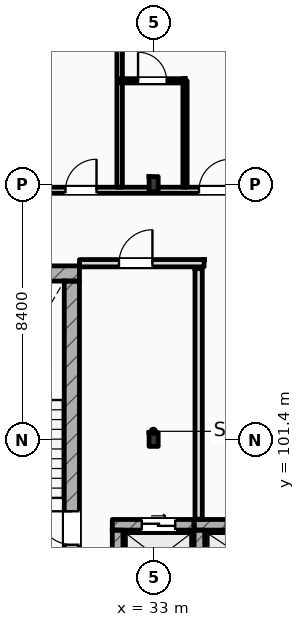
"""IFC4 building model, lengths in metres.
Left out: names, types, materials, properties, quantities, classifications, styles, units other than length and angle.
Written with IfcOpenShell. Run it as: python <this file> out.ifc"""

import sys

from ifc_helpers import new_model, si_unit, direction, frame, frame_2d, origin, origin_2d, place, context, subcontext, project, spatial, rectangle, i_section, extrude, element, fill, save


model = new_model("IFC4")
c1 = context("Model", 3, precision=1e-05, world=origin(), true_north=direction((0.0, 1.0)))
c2 = subcontext(c1, "Body", "Model", "MODEL_VIEW")
j1 = project(units=[si_unit("LENGTHUNIT", "METRE"), si_unit("PLANEANGLEUNIT", "RADIAN")], contexts=[c1])
p1 = place(None, origin())
s1 = spatial("IfcSite", under=j1, at=p1, CompositionType="ELEMENT")
p2 = place(p1, origin())
s2 = spatial("IfcBuilding", under=s1, at=p2, CompositionType="ELEMENT")
p3 = place(p2, frame((0.0, 0.0, 28.2)))
s3 = spatial("IfcBuildingStorey", under=s2, at=p3, CompositionType="ELEMENT", Elevation=28.2)
p4 = place(p3, frame((33.0, 101.4, 0.0), z_axis=(0.0, 0.0, 1.0), x_axis=(1.0, 0.0, 0.0)))
e1 = element("IfcColumn", 1, at=p4, inside=s3, PredefinedType="COLUMN", context=c2, shape_type="SweptSolid", body=[
    extrude(i_section(OverallWidth=0.3, OverallDepth=0.45, WebThickness=0.014, FlangeThickness=0.026, FilletRadius=0.027, at=origin_2d()), origin(), (0.0, 0.0, 1.0), 3.6),
])
p5 = place(p3, frame((33.0, 109.8, 0.0), z_axis=(0.0, 0.0, 1.0), x_axis=(1.0, 0.0, 0.0)))
e2 = element("IfcColumn", 2, at=p5, inside=s3, PredefinedType="COLUMN", context=c2, shape_type="SweptSolid", body=[
    extrude(i_section(OverallWidth=0.3, OverallDepth=0.5, WebThickness=0.014, FlangeThickness=0.028, FilletRadius=0.027, at=origin_2d()), origin(), (0.0, 0.0, 1.0), 3.6),
])
p6 = place(p3, frame((25.4, 106.862, 0.0), z_axis=(0.0, 0.0, 1.0), x_axis=(1.0, 0.0, 0.0)))
e3 = element("IfcWall", 3, at=p6, inside=s3, PredefinedType="SHEAR", context=c2, shape_type="SweptSolid", body=[
    extrude(rectangle(XDim=5.16, YDim=0.5, at=frame_2d((2.58, 0.0))), origin(), (0.0, 0.0, 1.0), 3.6),
])
p7 = place(p3, frame((30.31, 97.5, 0.0), z_axis=(0.0, 0.0, 1.0), x_axis=(0.0, 1.0, 0.0)))
e4 = element("IfcWall", 4, at=p7, inside=s3, PredefinedType="SHEAR", context=c2, shape_type="SweptSolid", body=[
    extrude(rectangle(XDim=9.112, YDim=0.5, at=frame_2d((4.556, 0.0))), origin(), (0.0, 0.0, 1.0), 3.6),
])
p8 = place(p7, frame((0.44, 0.0, 0.0)))
e5 = element("IfcOpeningElement", 5, at=p8, cuts=e4, PredefinedType="OPENING", context=c2, shape_type="SweptSolid", body=[
    extrude(rectangle(XDim=1.1, YDim=2.2, at=frame_2d((0.55, 1.1))), frame((0.0, 0.26, 0.0), z_axis=(0.0, -1.0, 0.0), x_axis=(1.0, 0.0, 0.0)), (0.0, 0.0, 1.0), 0.52),
])
p9 = place(p3, frame((31.64, 98.595, 0.0), z_axis=(0.0, 0.0, 1.0), x_axis=(1.0, 0.0, 0.0)))
e6 = element("IfcWall", 6, at=p9, inside=s3, PredefinedType="SHEAR", context=c2, shape_type="SweptSolid", body=[
    extrude(rectangle(XDim=2.69, YDim=0.35, at=frame_2d((1.345, 0.0))), origin(), (0.0, 0.0, 1.0), 3.36),
])
p10 = place(p9, frame((0.97, 0.0, 0.0)))
e7 = element("IfcOpeningElement", 7, at=p10, cuts=e6, PredefinedType="OPENING", context=c2, shape_type="SweptSolid", body=[
    extrude(rectangle(XDim=1.1, YDim=2.2, at=frame_2d((0.55, 1.1))), frame((0.0, 0.185, 0.0), z_axis=(0.0, -1.0, 0.0), x_axis=(1.0, 0.0, 0.0)), (0.0, 0.0, 1.0), 0.37),
])
p11 = place(p3, frame((31.815, 96.58, 0.0), z_axis=(0.0, 0.0, 1.0), x_axis=(0.0, 1.0, 0.0)))
e8 = element("IfcWall", 8, at=p11, inside=s3, PredefinedType="SHEAR", context=c2, shape_type="SweptSolid", body=[
    extrude(rectangle(XDim=1.84, YDim=0.35, at=frame_2d((0.92, 0.0))), origin(), (0.0, 0.0, 1.0), 3.36),
])
p12 = place(p3, frame((34.33, 98.595, 0.0), z_axis=(0.0, 0.0, 1.0), x_axis=(1.0, 0.0, 0.0)))
e9 = element("IfcWall", 9, at=p12, inside=s3, PredefinedType="SHEAR", context=c2, shape_type="SweptSolid", body=[
    extrude(rectangle(XDim=3.34, YDim=0.35, at=frame_2d((1.67, 0.0))), origin(), (0.0, 0.0, 1.0), 3.36),
])
p13 = place(p12, frame((1.045, 0.0, 0.0)))
e10 = element("IfcOpeningElement", 10, at=p13, cuts=e9, PredefinedType="OPENING", context=c2, shape_type="SweptSolid", body=[
    extrude(rectangle(XDim=1.25, YDim=2.25, at=frame_2d((0.625, 1.125))), frame((0.0, 0.185, 0.0), z_axis=(0.0, -1.0, 0.0), x_axis=(1.0, 0.0, 0.0)), (0.0, 0.0, 1.0), 0.37),
])
p14 = place(p3, frame((34.505, 96.58, 0.0), z_axis=(0.0, 0.0, 1.0), x_axis=(0.0, 1.0, 0.0)))
e11 = element("IfcWall", 11, at=p14, inside=s3, PredefinedType="SHEAR", context=c2, shape_type="SweptSolid", body=[
    extrude(rectangle(XDim=1.84, YDim=0.35, at=frame_2d((0.92, 0.0))), origin(), (0.0, 0.0, 1.0), 3.36),
])
p15 = place(p3, frame((34.48, 98.78, 0.0), z_axis=(0.0, 0.0, 1.0), x_axis=(0.0, 1.0, 0.0)))
e12 = element("IfcWall", 12, at=p15, inside=s3, PredefinedType="STANDARD", context=c2, shape_type="SweptSolid", body=[
    extrude(rectangle(XDim=8.24, YDim=0.24, at=frame_2d((4.12, 0.0))), origin(), (0.0, 0.0, 1.0), 3.36),
])
p16 = place(p3, frame((30.56, 107.2, 0.0), z_axis=(0.0, 0.0, 1.0), x_axis=(1.0, 0.0, 0.0)))
e13 = element("IfcWall", 13, at=p16, inside=s3, PredefinedType="STANDARD", context=c2, shape_type="SweptSolid", body=[
    extrude(rectangle(XDim=4.1, YDim=0.24, at=frame_2d((2.05, 0.0))), origin(), (0.0, 0.0, 1.0), 3.36),
])
p17 = place(p16, frame((1.3, 0.0, 0.0)))
e14 = element("IfcOpeningElement", 14, at=p17, cuts=e13, PredefinedType="OPENING", context=c2, shape_type="SweptSolid", body=[
    extrude(rectangle(XDim=1.1, YDim=2.2, at=frame_2d((0.55, 1.1))), frame((0.0, 0.13, 0.0), z_axis=(0.0, -1.0, 0.0), x_axis=(1.0, 0.0, 0.0)), (0.0, 0.0, 1.0), 0.26),
])
p18 = place(p3, frame((10.65, 109.6, 0.0), z_axis=(0.0, 0.0, 1.0), x_axis=(1.0, 0.0, 0.0)))
e15 = element("IfcWall", 15, at=p18, inside=s3, PredefinedType="PARTITIONING", context=c2, shape_type="SweptSolid", body=[
    extrude(rectangle(XDim=109.21, YDim=0.2, at=frame_2d((54.605, 0.0))), origin(), (0.0, 0.0, 1.0), 2.8),
])
p19 = place(p18, frame((12.611, 0.0, 0.0)))
e16 = element("IfcOpeningElement", 16, at=p19, cuts=e15, PredefinedType="OPENING", context=c2, shape_type="SweptSolid", body=[
    extrude(rectangle(XDim=1.02, YDim=2.2, at=frame_2d((0.51, 1.1))), frame((0.0, 0.11, 0.0), z_axis=(0.0, -1.0, 0.0), x_axis=(1.0, 0.0, 0.0)), (0.0, 0.0, 1.0), 0.22),
])
p20 = place(p18, frame((19.451, 0.0, 0.0)))
e17 = element("IfcOpeningElement", 17, at=p20, cuts=e15, PredefinedType="OPENING", context=c2, shape_type="SweptSolid", body=[
    extrude(rectangle(XDim=1.02, YDim=2.2, at=frame_2d((0.51, 1.1))), frame((0.0, 0.11, 0.0), z_axis=(0.0, -1.0, 0.0), x_axis=(1.0, 0.0, 0.0)), (0.0, 0.0, 1.0), 0.22),
])
p21 = place(p18, frame((23.842, 0.0, 0.0)))
e18 = element("IfcOpeningElement", 18, at=p21, cuts=e15, PredefinedType="OPENING", context=c2, shape_type="SweptSolid", body=[
    extrude(rectangle(XDim=1.02, YDim=2.2, at=frame_2d((0.51, 1.1))), frame((0.0, 0.11, 0.0), z_axis=(0.0, -1.0, 0.0), x_axis=(1.0, 0.0, 0.0)), (0.0, 0.0, 1.0), 0.22),
])
p22 = place(p18, frame((26.084, 0.0, 0.0)))
e19 = element("IfcOpeningElement", 19, at=p22, cuts=e15, PredefinedType="OPENING", context=c2, shape_type="SweptSolid", body=[
    extrude(rectangle(XDim=1.02, YDim=2.2, at=frame_2d((0.51, 1.1))), frame((0.0, 0.11, 0.0), z_axis=(0.0, -1.0, 0.0), x_axis=(1.0, 0.0, 0.0)), (0.0, 0.0, 1.0), 0.22),
])
p23 = place(p18, frame((32.655, 0.0, 0.0)))
e20 = element("IfcOpeningElement", 20, at=p23, cuts=e15, PredefinedType="OPENING", context=c2, shape_type="SweptSolid", body=[
    extrude(rectangle(XDim=0.96, YDim=2.2, at=frame_2d((0.48, 1.1))), frame((0.0, 0.11, 0.0), z_axis=(0.0, -1.0, 0.0), x_axis=(1.0, 0.0, 0.0)), (0.0, 0.0, 1.0), 0.22),
])
p24 = place(p18, frame((34.895, 0.0, 0.0)))
e21 = element("IfcOpeningElement", 21, at=p24, cuts=e15, PredefinedType="OPENING", context=c2, shape_type="SweptSolid", body=[
    extrude(rectangle(XDim=0.96, YDim=2.2, at=frame_2d((0.48, 1.1))), frame((0.0, 0.11, 0.0), z_axis=(0.0, -1.0, 0.0), x_axis=(1.0, 0.0, 0.0)), (0.0, 0.0, 1.0), 0.22),
])
p25 = place(p18, frame((41.436, 0.0, 0.0)))
e22 = element("IfcOpeningElement", 22, at=p25, cuts=e15, PredefinedType="OPENING", context=c2, shape_type="SweptSolid", body=[
    extrude(rectangle(XDim=0.96, YDim=2.2, at=frame_2d((0.48, 1.1))), frame((0.0, 0.11, 0.0), z_axis=(0.0, -1.0, 0.0), x_axis=(1.0, 0.0, 0.0)), (0.0, 0.0, 1.0), 0.22),
])
p26 = place(p18, frame((43.427, 0.0, 0.0)))
e23 = element("IfcOpeningElement", 23, at=p26, cuts=e15, PredefinedType="OPENING", context=c2, shape_type="SweptSolid", body=[
    extrude(rectangle(XDim=0.96, YDim=2.2, at=frame_2d((0.48, 1.1))), frame((0.0, 0.11, 0.0), z_axis=(0.0, -1.0, 0.0), x_axis=(1.0, 0.0, 0.0)), (0.0, 0.0, 1.0), 0.22),
])
p27 = place(p18, frame((50.218, 0.0, 0.0)))
e24 = element("IfcOpeningElement", 24, at=p27, cuts=e15, PredefinedType="OPENING", context=c2, shape_type="SweptSolid", body=[
    extrude(rectangle(XDim=0.96, YDim=2.2, at=frame_2d((0.48, 1.1))), frame((0.0, 0.11, 0.0), z_axis=(0.0, -1.0, 0.0), x_axis=(1.0, 0.0, 0.0)), (0.0, 0.0, 1.0), 0.22),
])
p28 = place(p18, frame((54.859, 0.0, 0.0)))
e25 = element("IfcOpeningElement", 25, at=p28, cuts=e15, PredefinedType="OPENING", context=c2, shape_type="SweptSolid", body=[
    extrude(rectangle(XDim=0.96, YDim=2.2, at=frame_2d((0.48, 1.1))), frame((0.0, 0.11, 0.0), z_axis=(0.0, -1.0, 0.0), x_axis=(1.0, 0.0, 0.0)), (0.0, 0.0, 1.0), 0.22),
])
p29 = place(p18, frame((59.0, 0.0, 0.0)))
e26 = element("IfcOpeningElement", 26, at=p29, cuts=e15, PredefinedType="OPENING", context=c2, shape_type="SweptSolid", body=[
    extrude(rectangle(XDim=0.96, YDim=2.2, at=frame_2d((0.48, 1.1))), frame((0.0, 0.11, 0.0), z_axis=(0.0, -1.0, 0.0), x_axis=(1.0, 0.0, 0.0)), (0.0, 0.0, 1.0), 0.22),
])
p30 = place(p18, frame((63.39, 0.0, 0.0)))
e27 = element("IfcOpeningElement", 27, at=p30, cuts=e15, PredefinedType="OPENING", context=c2, shape_type="SweptSolid", body=[
    extrude(rectangle(XDim=0.96, YDim=2.2, at=frame_2d((0.48, 1.1))), frame((0.0, 0.11, 0.0), z_axis=(0.0, -1.0, 0.0), x_axis=(1.0, 0.0, 0.0)), (0.0, 0.0, 1.0), 0.22),
])
p31 = place(p18, frame((65.631, 0.0, 0.0)))
e28 = element("IfcOpeningElement", 28, at=p31, cuts=e15, PredefinedType="OPENING", context=c2, shape_type="SweptSolid", body=[
    extrude(rectangle(XDim=0.96, YDim=2.2, at=frame_2d((0.48, 1.1))), frame((0.0, 0.11, 0.0), z_axis=(0.0, -1.0, 0.0), x_axis=(1.0, 0.0, 0.0)), (0.0, 0.0, 1.0), 0.22),
])
p32 = place(p18, frame((72.172, 0.0, 0.0)))
e29 = element("IfcOpeningElement", 29, at=p32, cuts=e15, PredefinedType="OPENING", context=c2, shape_type="SweptSolid", body=[
    extrude(rectangle(XDim=0.96, YDim=2.2, at=frame_2d((0.48, 1.1))), frame((0.0, 0.11, 0.0), z_axis=(0.0, -1.0, 0.0), x_axis=(1.0, 0.0, 0.0)), (0.0, 0.0, 1.0), 0.22),
])
p33 = place(p18, frame((74.413, 0.0, 0.0)))
e30 = element("IfcOpeningElement", 30, at=p33, cuts=e15, PredefinedType="OPENING", context=c2, shape_type="SweptSolid", body=[
    extrude(rectangle(XDim=0.96, YDim=2.2, at=frame_2d((0.48, 1.1))), frame((0.0, 0.11, 0.0), z_axis=(0.0, -1.0, 0.0), x_axis=(1.0, 0.0, 0.0)), (0.0, 0.0, 1.0), 0.22),
])
p34 = place(p18, frame((80.954, 0.0, 0.0)))
e31 = element("IfcOpeningElement", 31, at=p34, cuts=e15, PredefinedType="OPENING", context=c2, shape_type="SweptSolid", body=[
    extrude(rectangle(XDim=0.96, YDim=2.2, at=frame_2d((0.48, 1.1))), frame((0.0, 0.11, 0.0), z_axis=(0.0, -1.0, 0.0), x_axis=(1.0, 0.0, 0.0)), (0.0, 0.0, 1.0), 0.22),
])
p35 = place(p18, frame((83.195, 0.0, 0.0)))
e32 = element("IfcOpeningElement", 32, at=p35, cuts=e15, PredefinedType="OPENING", context=c2, shape_type="SweptSolid", body=[
    extrude(rectangle(XDim=0.96, YDim=2.2, at=frame_2d((0.48, 1.1))), frame((0.0, 0.11, 0.0), z_axis=(0.0, -1.0, 0.0), x_axis=(1.0, 0.0, 0.0)), (0.0, 0.0, 1.0), 0.22),
])
p36 = place(p18, frame((89.735, 0.0, 0.0)))
e33 = element("IfcOpeningElement", 33, at=p36, cuts=e15, PredefinedType="OPENING", context=c2, shape_type="SweptSolid", body=[
    extrude(rectangle(XDim=0.96, YDim=2.2, at=frame_2d((0.48, 1.1))), frame((0.0, 0.11, 0.0), z_axis=(0.0, -1.0, 0.0), x_axis=(1.0, 0.0, 0.0)), (0.0, 0.0, 1.0), 0.22),
])
p37 = place(p18, frame((94.126, 0.0, 0.0)))
e34 = element("IfcOpeningElement", 34, at=p37, cuts=e15, PredefinedType="OPENING", context=c2, shape_type="SweptSolid", body=[
    extrude(rectangle(XDim=0.96, YDim=2.2, at=frame_2d((0.48, 1.1))), frame((0.0, 0.11, 0.0), z_axis=(0.0, -1.0, 0.0), x_axis=(1.0, 0.0, 0.0)), (0.0, 0.0, 1.0), 0.22),
])
p38 = place(p18, frame((98.517, 0.0, 0.0)))
e35 = element("IfcOpeningElement", 35, at=p38, cuts=e15, PredefinedType="OPENING", context=c2, shape_type="SweptSolid", body=[
    extrude(rectangle(XDim=0.96, YDim=2.2, at=frame_2d((0.48, 1.1))), frame((0.0, 0.11, 0.0), z_axis=(0.0, -1.0, 0.0), x_axis=(1.0, 0.0, 0.0)), (0.0, 0.0, 1.0), 0.22),
])
p39 = place(p18, frame((102.908, 0.0, 0.0)))
e36 = element("IfcOpeningElement", 36, at=p39, cuts=e15, PredefinedType="OPENING", context=c2, shape_type="SweptSolid", body=[
    extrude(rectangle(XDim=0.96, YDim=2.2, at=frame_2d((0.48, 1.1))), frame((0.0, 0.11, 0.0), z_axis=(0.0, -1.0, 0.0), x_axis=(1.0, 0.0, 0.0)), (0.0, 0.0, 1.0), 0.22),
])
p40 = place(p18, frame((105.099, 0.0, 0.0)))
e37 = element("IfcOpeningElement", 37, at=p40, cuts=e15, PredefinedType="OPENING", context=c2, shape_type="SweptSolid", body=[
    extrude(rectangle(XDim=0.96, YDim=2.2, at=frame_2d((0.48, 1.1))), frame((0.0, 0.11, 0.0), z_axis=(0.0, -1.0, 0.0), x_axis=(1.0, 0.0, 0.0)), (0.0, 0.0, 1.0), 0.22),
])
p41 = place(p18, frame((2.716, 0.0, 0.0)))
e38 = element("IfcOpeningElement", 38, at=p41, cuts=e15, PredefinedType="OPENING", context=c2, shape_type="SweptSolid", body=[
    extrude(rectangle(XDim=1.35, YDim=2.25, at=frame_2d((0.675, 1.125))), frame((0.0, 0.11, 0.0), z_axis=(0.0, -1.0, 0.0), x_axis=(1.0, 0.0, 0.0)), (0.0, 0.0, 1.0), 0.22),
])
p42 = place(p18, frame((6.65, 0.0, 0.0)))
e39 = element("IfcOpeningElement", 39, at=p42, cuts=e15, PredefinedType="OPENING", context=c2, shape_type="SweptSolid", body=[
    extrude(rectangle(XDim=1.35, YDim=2.25, at=frame_2d((0.675, 1.125))), frame((0.0, 0.11, 0.0), z_axis=(0.0, -1.0, 0.0), x_axis=(1.0, 0.0, 0.0)), (0.0, 0.0, 1.0), 0.22),
])
p43 = place(p18, frame((10.583, 0.0, 0.0)))
e40 = element("IfcOpeningElement", 40, at=p43, cuts=e15, PredefinedType="OPENING", context=c2, shape_type="SweptSolid", body=[
    extrude(rectangle(XDim=1.35, YDim=2.25, at=frame_2d((0.675, 1.125))), frame((0.0, 0.11, 0.0), z_axis=(0.0, -1.0, 0.0), x_axis=(1.0, 0.0, 0.0)), (0.0, 0.0, 1.0), 0.22),
])
p44 = place(p3, frame((31.882, 109.7, 0.0), z_axis=(0.0, 0.0, 1.0), x_axis=(0.0, 1.0, 0.0)))
e41 = element("IfcWall", 41, at=p44, inside=s3, PredefinedType="PARTITIONING", context=c2, shape_type="SweptSolid", body=[
    extrude(rectangle(XDim=8.15, YDim=0.18, at=frame_2d((4.075, 0.0))), origin(), (0.0, 0.0, 1.0), 3.36),
])
p45 = place(p3, frame((34.032, 109.7, 0.0), z_axis=(0.0, 0.0, 1.0), x_axis=(0.0, 1.0, 0.0)))
e42 = element("IfcWall", 42, at=p45, inside=s3, PredefinedType="PARTITIONING", context=c2, shape_type="SweptSolid", body=[
    extrude(rectangle(XDim=3.5, YDim=0.14, at=frame_2d((1.75, 0.0))), origin(), (0.0, 0.0, 1.0), 3.36),
])
p46 = place(p3, frame((31.882, 113.2, 0.0), z_axis=(0.0, 0.0, 1.0), x_axis=(1.0, 0.0, 0.0)))
e43 = element("IfcWall", 43, at=p46, inside=s3, PredefinedType="PARTITIONING", context=c2, shape_type="SweptSolid", body=[
    extrude(rectangle(XDim=2.15, YDim=0.14, at=frame_2d((1.075, 0.0))), origin(), (0.0, 0.0, 1.0), 3.36),
])
p47 = place(p46, frame((0.605, 0.0, 0.0)))
e44 = element("IfcOpeningElement", 44, at=p47, cuts=e43, PredefinedType="OPENING", context=c2, shape_type="SweptSolid", body=[
    extrude(rectangle(XDim=0.94, YDim=2.15, at=frame_2d((0.47, 1.075))), frame((0.0, 0.08, 0.0), z_axis=(0.0, -1.0, 0.0), x_axis=(1.0, 0.0, 0.0)), (0.0, 0.0, 1.0), 0.16),
])
p48 = place(p8, origin())
e45 = element("IfcDoor", 45, at=p48, inside=s3, OperationType="SINGLE_SWING_RIGHT", PredefinedType="DOOR", context=c2, shape_type="SweptSolid", body=[
    extrude(rectangle(XDim=1.1, YDim=2.2, at=frame_2d((0.55, 1.1))), frame((0.0, 0.025, 0.0), z_axis=(0.0, -1.0, 0.0), x_axis=(1.0, 0.0, 0.0)), (0.0, 0.0, 1.0), 0.05),
])
fill(e5, e45)
p49 = place(p10, origin())
e46 = element("IfcDoor", 46, at=p49, inside=s3, OperationType="SLIDING_TO_LEFT", PredefinedType="DOOR", context=c2, shape_type="SweptSolid", body=[
    extrude(rectangle(XDim=1.1, YDim=2.2, at=frame_2d((0.55, 1.1))), frame((0.0, 0.025, 0.0), z_axis=(0.0, -1.0, 0.0), x_axis=(1.0, 0.0, 0.0)), (0.0, 0.0, 1.0), 0.05),
])
fill(e7, e46)
p50 = place(p17, origin())
e47 = element("IfcDoor", 47, at=p50, inside=s3, OperationType="SINGLE_SWING_RIGHT", PredefinedType="DOOR", context=c2, shape_type="SweptSolid", body=[
    extrude(rectangle(XDim=1.1, YDim=2.2, at=frame_2d((0.55, 1.1))), frame((0.0, 0.025, 0.0), z_axis=(0.0, -1.0, 0.0), x_axis=(1.0, 0.0, 0.0)), (0.0, 0.0, 1.0), 0.05),
])
fill(e14, e47)
p51 = place(p20, origin())
e48 = element("IfcDoor", 48, at=p51, inside=s3, OperationType="SINGLE_SWING_RIGHT", PredefinedType="DOOR", context=c2, shape_type="SweptSolid", body=[
    extrude(rectangle(XDim=1.02, YDim=2.2, at=frame_2d((0.51, 1.1))), frame((0.0, 0.025, 0.0), z_axis=(0.0, -1.0, 0.0), x_axis=(1.0, 0.0, 0.0)), (0.0, 0.0, 1.0), 0.05),
])
fill(e17, e48)
p52 = place(p21, origin())
e49 = element("IfcDoor", 49, at=p52, inside=s3, OperationType="SINGLE_SWING_RIGHT", PredefinedType="DOOR", context=c2, shape_type="SweptSolid", body=[
    extrude(rectangle(XDim=1.02, YDim=2.2, at=frame_2d((0.51, 1.1))), frame((0.0, 0.025, 0.0), z_axis=(0.0, -1.0, 0.0), x_axis=(1.0, 0.0, 0.0)), (0.0, 0.0, 1.0), 0.05),
])
fill(e18, e49)
p53 = place(p47, origin())
e50 = element("IfcDoor", 50, at=p53, inside=s3, OperationType="SINGLE_SWING_LEFT", PredefinedType="DOOR", context=c2, shape_type="SweptSolid", body=[
    extrude(rectangle(XDim=0.94, YDim=2.15, at=frame_2d((0.47, 1.075))), frame((0.0, 0.025, 0.0), z_axis=(0.0, -1.0, 0.0), x_axis=(1.0, 0.0, 0.0)), (0.0, 0.0, 1.0), 0.05),
])
fill(e44, e50)
save(model, sys.argv[1])
